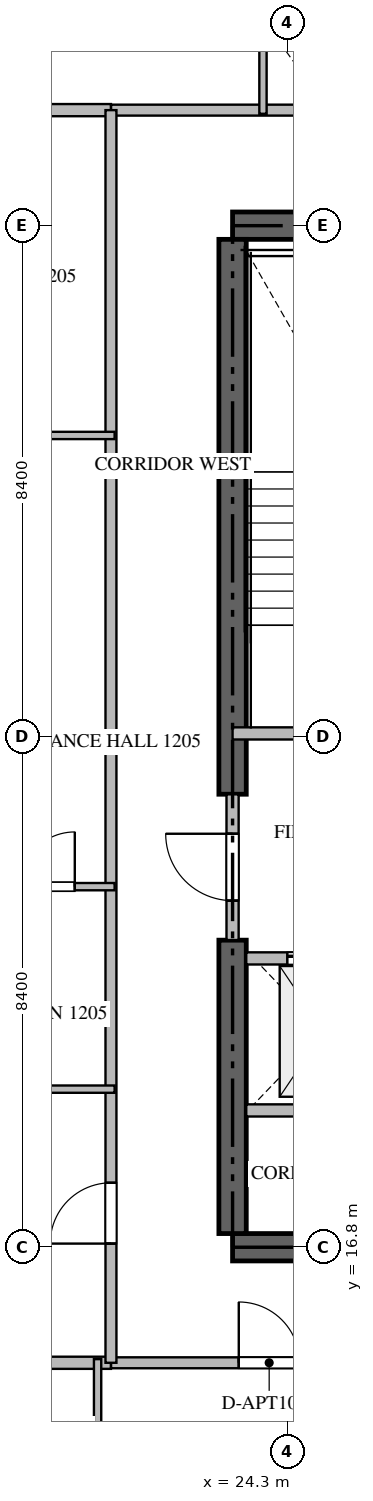
"""IFC4 building model, lengths in metres.
Left out: names, types, materials, properties, quantities, classifications, styles, units other than length and angle.
Written with IfcOpenShell. Run it as: python <this file> out.ifc"""

import sys

from ifc_helpers import new_model, si_unit, direction, frame, frame_2d, origin, place, context, subcontext, project, spatial, rectangle, extrude, source, transform, mapped, element, fill, save


model = new_model("IFC4")
c1 = context("Model", 3, precision=1e-05, world=origin(), true_north=direction((0.0, 1.0)))
c2 = subcontext(c1, "Body", "Model", "MODEL_VIEW")
j1 = project(units=[si_unit("LENGTHUNIT", "METRE"), si_unit("PLANEANGLEUNIT", "RADIAN")], contexts=[c1])
p1 = place(None, origin())
s1 = spatial("IfcSite", under=j1, at=p1, CompositionType="ELEMENT")
p2 = place(p1, origin())
s2 = spatial("IfcBuilding", under=s1, at=p2, CompositionType="ELEMENT")
p3 = place(p2, frame((0.0, 0.0, 52.95)))
s3 = spatial("IfcBuildingStorey", under=s2, at=p3, CompositionType="ELEMENT", Elevation=52.95)
for number, where, z_axis, x_axis in (
    (1, (23.4, 16.8, -0.26), (0.0, 0.0, 1.0), (1.0, 0.0, 0.0)),
    (2, (41.4, 33.6, -0.26), (0.0, 0.0, 1.0), (-1.0, 0.0, 0.0)),
):
    element("IfcWall", number, at=place(p3, frame(where, z_axis=z_axis, x_axis=x_axis)), inside=s3, PredefinedType="SHEAR", context=c2, shape_type="SweptSolid", body=[
        extrude(rectangle(XDim=18.0, YDim=0.45, at=frame_2d((9.0, 0.0))), origin(), (0.0, 0.0, 1.0), 3.748),
    ])
p4 = place(p3, frame((23.4, 17.025, -0.26), z_axis=(0.0, 0.0, 1.0), x_axis=(0.0, 1.0, 0.0)))
e3 = element("IfcWall", 3, at=p4, inside=s3, PredefinedType="SHEAR", context=c2, shape_type="SweptSolid", body=[
    extrude(rectangle(XDim=4.825, YDim=0.45, at=frame_2d((2.413, 0.0))), origin(), (0.0, 0.0, 1.0), 3.748),
])
p5 = place(p3, frame((23.4, 24.25, -0.26), z_axis=(0.0, 0.0, 1.0), x_axis=(0.0, 1.0, 0.0)))
e4 = element("IfcWall", 4, at=p5, inside=s3, PredefinedType="SHEAR", context=c2, shape_type="SweptSolid", body=[
    extrude(rectangle(XDim=9.125, YDim=0.45, at=frame_2d((4.562, 0.0))), origin(), (0.0, 0.0, 1.0), 3.748),
])
p6 = place(p3, frame((23.4, 25.25, 0.0), z_axis=(0.0, 0.0, 1.0), x_axis=(1.0, 0.0, 0.0)))
e5 = element("IfcWall", 5, at=p6, inside=s3, PredefinedType="STANDARD", context=c2, shape_type="SweptSolid", body=[
    extrude(rectangle(XDim=4.45, YDim=0.2, at=frame_2d((2.225, 0.0))), origin(), (0.0, 0.0, 1.0), 3.49),
])
p7 = place(p6, frame((1.65, 0.0, 0.0)))
e6 = element("IfcOpeningElement", 6, at=p7, cuts=e5, PredefinedType="OPENING", context=c2, shape_type="SweptSolid", body=[
    extrude(rectangle(XDim=1.1, YDim=2.15, at=frame_2d((0.55, 1.075))), frame((0.0, 0.11, 0.0), z_axis=(0.0, -1.0, 0.0), x_axis=(1.0, 0.0, 0.0)), (0.0, 0.0, 1.0), 0.22),
])
p8 = place(p3, frame((23.625, 21.55, 0.0), z_axis=(0.0, 0.0, 1.0), x_axis=(1.0, 0.0, 0.0)))
e7 = element("IfcWall", 7, at=p8, inside=s3, PredefinedType="STANDARD", context=c2, shape_type="SweptSolid", body=[
    extrude(rectangle(XDim=2.425, YDim=0.2, at=frame_2d((1.212, 0.0))), origin(), (0.0, 0.0, 1.0), 3.49),
])
p9 = place(p8, frame((0.675, 0.0, 0.0)))
e8 = element("IfcOpeningElement", 8, at=p9, cuts=e7, PredefinedType="OPENING", context=c2, shape_type="SweptSolid", body=[
    extrude(rectangle(XDim=1.2, YDim=2.2, at=frame_2d((0.6, 1.1))), frame((0.0, 0.11, 0.0), z_axis=(0.0, -1.0, 0.0), x_axis=(1.0, 0.0, 0.0)), (0.0, 0.0, 1.0), 0.22),
])
p10 = place(p3, frame((23.625, 19.05, 0.0), z_axis=(0.0, 0.0, 1.0), x_axis=(1.0, 0.0, 0.0)))
e9 = element("IfcWall", 9, at=p10, inside=s3, PredefinedType="STANDARD", context=c2, shape_type="SweptSolid", body=[
    extrude(rectangle(XDim=2.425, YDim=0.2, at=frame_2d((1.212, 0.0))), origin(), (0.0, 0.0, 1.0), 3.49),
])
p11 = place(p3, frame((23.4, 21.852, 0.0), z_axis=(0.0, 0.0, 1.0), x_axis=(0.0, 1.0, 0.0)))
e10 = element("IfcWall", 10, at=p11, inside=s3, PredefinedType="STANDARD", context=c2, shape_type="SweptSolid", body=[
    extrude(rectangle(XDim=2.396, YDim=0.2, at=frame_2d((1.198, 0.0))), origin(), (0.0, 0.0, 1.0), 3.49),
])
p12 = place(p11, frame((0.648, 0.0, 0.0)))
e11 = element("IfcOpeningElement", 11, at=p12, cuts=e10, PredefinedType="OPENING", context=c2, shape_type="SweptSolid", body=[
    extrude(rectangle(XDim=1.1, YDim=2.15, at=frame_2d((0.55, 1.075))), frame((0.0, 0.11, 0.0), z_axis=(0.0, -1.0, 0.0), x_axis=(1.0, 0.0, 0.0)), (0.0, 0.0, 1.0), 0.22),
])
for number, where, z_axis, x_axis in (
    (12, (6.082, 14.9, 0.0), (0.0, 0.0, 1.0), (1.0, 0.0, 0.0)),
    (13, (6.082, 35.5, 0.0), (0.0, 0.0, 1.0), (1.0, 0.0, 0.0)),
):
    element("IfcWall", number, at=place(p3, frame(where, z_axis=z_axis, x_axis=x_axis)), inside=s3, PredefinedType="PARTITIONING", context=c2, shape_type="SweptSolid", body=[
        extrude(rectangle(XDim=15.318, YDim=0.2, at=frame_2d((7.659, 0.0))), origin(), (0.0, 0.0, 1.0), 3.49),
    ])
p13 = place(p3, frame((21.402, 14.9, 0.0), z_axis=(0.0, 0.0, 1.0), x_axis=(1.0, 0.0, 0.0)))
e14 = element("IfcWall", 14, at=p13, inside=s3, PredefinedType="PARTITIONING", context=c2, shape_type="SweptSolid", body=[
    extrude(rectangle(XDim=21.996, YDim=0.18, at=frame_2d((10.998, 0.0))), origin(), (0.0, 0.0, 1.0), 3.49),
])
p14 = place(p13, frame((2.1, 0.0, 0.0)))
e15 = element("IfcOpeningElement", 15, at=p14, cuts=e14, PredefinedType="OPENING", context=c2, shape_type="SweptSolid", body=[
    extrude(rectangle(XDim=1.0, YDim=2.15, at=frame_2d((0.5, 1.075))), frame((0.0, 0.1, 0.0), z_axis=(0.0, -1.0, 0.0), x_axis=(1.0, 0.0, 0.0)), (0.0, 0.0, 1.0), 0.2),
])
p15 = place(p13, frame((14.172, 0.0, 0.0)))
e16 = element("IfcOpeningElement", 16, at=p15, cuts=e14, PredefinedType="OPENING", context=c2, shape_type="SweptSolid", body=[
    extrude(rectangle(XDim=1.0, YDim=2.15, at=frame_2d((0.5, 1.075))), frame((0.0, 0.1, 0.0), z_axis=(0.0, -1.0, 0.0), x_axis=(1.0, 0.0, 0.0)), (0.0, 0.0, 1.0), 0.2),
])
p16 = place(p13, frame((18.896, 0.0, 0.0)))
e17 = element("IfcOpeningElement", 17, at=p16, cuts=e14, PredefinedType="OPENING", context=c2, shape_type="SweptSolid", body=[
    extrude(rectangle(XDim=1.0, YDim=2.15, at=frame_2d((0.5, 1.075))), frame((0.0, 0.1, 0.0), z_axis=(0.0, -1.0, 0.0), x_axis=(1.0, 0.0, 0.0)), (0.0, 0.0, 1.0), 0.2),
])
p17 = place(p3, frame((21.402, 35.5, 0.0), z_axis=(0.0, 0.0, 1.0), x_axis=(1.0, 0.0, 0.0)))
e18 = element("IfcWall", 18, at=p17, inside=s3, PredefinedType="PARTITIONING", context=c2, shape_type="SweptSolid", body=[
    extrude(rectangle(XDim=21.996, YDim=0.18, at=frame_2d((10.998, 0.0))), origin(), (0.0, 0.0, 1.0), 3.49),
])
p18 = place(p17, frame((15.222, 0.0, 0.0)))
e19 = element("IfcOpeningElement", 19, at=p18, cuts=e18, PredefinedType="OPENING", context=c2, shape_type="SweptSolid", body=[
    extrude(rectangle(XDim=1.0, YDim=2.15, at=frame_2d((0.5, 1.075))), frame((0.0, 0.1, 0.0), z_axis=(0.0, -1.0, 0.0), x_axis=(1.0, 0.0, 0.0)), (0.0, 0.0, 1.0), 0.2),
])
p19 = place(p3, frame((21.4, 14.9, 0.0), z_axis=(0.0, 0.0, 1.0), x_axis=(0.0, 1.0, 0.0)))
e20 = element("IfcWall", 20, at=p19, inside=s3, PredefinedType="PARTITIONING", context=c2, shape_type="SweptSolid", body=[
    extrude(rectangle(XDim=20.6, YDim=0.18, at=frame_2d((10.3, 0.0))), origin(), (0.0, 0.0, 1.0), 3.49),
])
p20 = place(p19, frame((1.96, 0.0, 0.0)))
e21 = element("IfcOpeningElement", 21, at=p20, cuts=e20, PredefinedType="OPENING", context=c2, shape_type="SweptSolid", body=[
    extrude(rectangle(XDim=1.0, YDim=2.15, at=frame_2d((0.5, 1.075))), frame((0.0, 0.1, 0.0), z_axis=(0.0, -1.0, 0.0), x_axis=(1.0, 0.0, 0.0)), (0.0, 0.0, 1.0), 0.2),
])
p21 = place(p3, frame((21.18, 12.15, 0.0), z_axis=(0.0, 0.0, 1.0), x_axis=(0.0, 1.0, 0.0)))
e22 = element("IfcWall", 22, at=p21, inside=s3, PredefinedType="PARTITIONING", context=c2, shape_type="SweptSolid", body=[
    extrude(rectangle(XDim=2.81, YDim=0.12, at=frame_2d((1.405, 0.0))), origin(), (0.0, 0.0, 1.0), 3.49),
])
p22 = place(p3, frame((23.9, 37.648, 0.0), z_axis=(0.0, 0.0, 1.0), x_axis=(0.0, -1.0, 0.0)))
e23 = element("IfcWall", 23, at=p22, inside=s3, PredefinedType="PARTITIONING", context=c2, shape_type="SweptSolid", body=[
    extrude(rectangle(XDim=2.208, YDim=0.12, at=frame_2d((1.104, 0.0))), origin(), (0.0, 0.0, 1.0), 3.49),
])
p23 = place(p3, frame((18.65, 19.4, 0.0), z_axis=(0.0, 0.0, 1.0), x_axis=(1.0, 0.0, 0.0)))
e24 = element("IfcWall", 24, at=p23, inside=s3, PredefinedType="PARTITIONING", context=c2, shape_type="SweptSolid", body=[
    extrude(rectangle(XDim=2.81, YDim=0.12, at=frame_2d((1.405, 0.0))), origin(), (0.0, 0.0, 1.0), 3.49),
])
p24 = place(p3, frame((19.25, 22.73, 0.0), z_axis=(0.0, 0.0, 1.0), x_axis=(1.0, 0.0, 0.0)))
e25 = element("IfcWall", 25, at=p24, inside=s3, PredefinedType="PARTITIONING", context=c2, shape_type="SweptSolid", body=[
    extrude(rectangle(XDim=2.21, YDim=0.12, at=frame_2d((1.105, 0.0))), origin(), (0.0, 0.0, 1.0), 3.49),
])
p25 = place(p24, frame((0.655, 0.0, 0.0)))
e26 = element("IfcOpeningElement", 26, at=p25, cuts=e25, PredefinedType="OPENING", context=c2, shape_type="SweptSolid", body=[
    extrude(rectangle(XDim=0.9, YDim=2.1, at=frame_2d((0.45, 1.05))), frame((0.0, 0.07, 0.0), z_axis=(0.0, -1.0, 0.0), x_axis=(1.0, 0.0, 0.0)), (0.0, 0.0, 1.0), 0.14),
])
p26 = place(p3, frame((19.252, 30.15, 0.0), z_axis=(0.0, 0.0, 1.0), x_axis=(1.0, 0.0, 0.0)))
e27 = element("IfcWall", 27, at=p26, inside=s3, PredefinedType="PARTITIONING", context=c2, shape_type="SweptSolid", body=[
    extrude(rectangle(XDim=2.208, YDim=0.12, at=frame_2d((1.104, 0.0))), origin(), (0.0, 0.0, 1.0), 3.49),
])
m1 = source(origin(), c2, "Body", "SweptSolid", [
    extrude(rectangle(XDim=1.2, YDim=2.2, at=frame_2d((0.6, 1.1))), frame((0.0, 0.025, 0.0), z_axis=(0.0, -1.0, 0.0), x_axis=(1.0, 0.0, 0.0)), (0.0, 0.0, 1.0), 0.05),
])
p27 = place(p9, origin())
e28 = element("IfcDoor", 28, at=p27, inside=s3, OperationType="DOUBLE_DOOR_SLIDING", PredefinedType="DOOR", context=c2, shape_type="MappedRepresentation", body=[
    mapped(m1, transform((0.0, 0.0, 0.0), scale=1.0)),
])
fill(e8, e28)
m2 = source(origin(), c2, "Body", "SweptSolid", [
    extrude(rectangle(XDim=1.1, YDim=2.15, at=frame_2d((0.55, 1.075))), frame((0.0, 0.025, 0.0), z_axis=(0.0, -1.0, 0.0), x_axis=(1.0, 0.0, 0.0)), (0.0, 0.0, 1.0), 0.05),
])
p28 = place(p12, origin())
e29 = element("IfcDoor", 29, at=p28, inside=s3, OperationType="SINGLE_SWING_RIGHT", PredefinedType="DOOR", context=c2, shape_type="MappedRepresentation", body=[
    mapped(m2, transform((0.0, 0.0, 0.0), scale=1.0)),
])
fill(e11, e29)
m3 = source(origin(), c2, "Body", "SweptSolid", [
    extrude(rectangle(XDim=1.0, YDim=2.15, at=frame_2d((0.5, 1.075))), frame((0.0, 0.025, 0.0), z_axis=(0.0, -1.0, 0.0), x_axis=(1.0, 0.0, 0.0)), (0.0, 0.0, 1.0), 0.05),
])
p29 = place(p14, origin())
e30 = element("IfcDoor", 30, at=p29, inside=s3, OperationType="SINGLE_SWING_LEFT", PredefinedType="DOOR", context=c2, shape_type="MappedRepresentation", body=[
    mapped(m3, transform((0.0, 0.0, 0.0), scale=1.0)),
])
fill(e15, e30)
p30 = place(p20, origin())
e31 = element("IfcDoor", 31, at=p30, inside=s3, OperationType="SINGLE_SWING_LEFT", PredefinedType="DOOR", context=c2, shape_type="MappedRepresentation", body=[
    mapped(m3, transform((0.0, 0.0, 0.0), scale=1.0)),
])
fill(e21, e31)
m4 = source(origin(), c2, "Body", "SweptSolid", [
    extrude(rectangle(XDim=0.9, YDim=2.1, at=frame_2d((0.45, 1.05))), frame((0.0, 0.025, 0.0), z_axis=(0.0, -1.0, 0.0), x_axis=(1.0, 0.0, 0.0)), (0.0, 0.0, 1.0), 0.05),
])
p31 = place(p25, origin())
e32 = element("IfcDoor", 32, at=p31, inside=s3, OperationType="SINGLE_SWING_RIGHT", PredefinedType="DOOR", context=c2, shape_type="MappedRepresentation", body=[
    mapped(m4, transform((0.0, 0.0, 0.0), scale=1.0)),
])
fill(e26, e32)
save(model, sys.argv[1])
